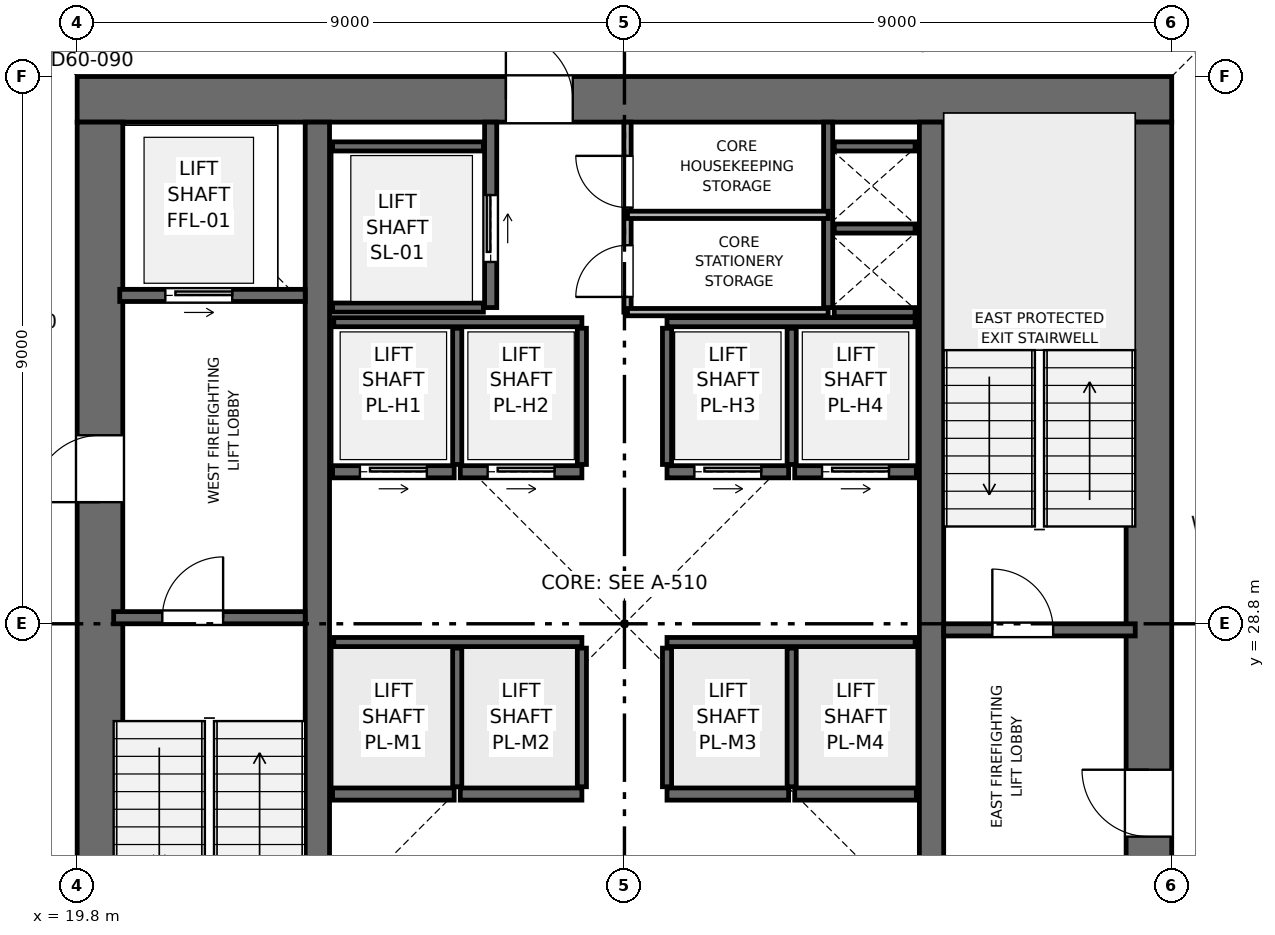
"""IFC4 building model, lengths in metres.
Left out: names, types, materials, properties, quantities, classifications, styles, units other than length and angle.
Written with IfcOpenShell. Run it as: python <this file> out.ifc"""

import sys

from ifc_helpers import new_model, si_unit, direction, frame, frame_2d, origin, place, context, subcontext, project, spatial, rectangle, extrude, element, fill, save


model = new_model("IFC4")
c1 = context("Model", 3, precision=1e-05, world=origin(), true_north=direction((0.0, 1.0)))
c2 = subcontext(c1, "Body", "Model", "MODEL_VIEW")
j1 = project(units=[si_unit("LENGTHUNIT", "METRE"), si_unit("PLANEANGLEUNIT", "RADIAN")], contexts=[c1])
p1 = place(None, origin())
s1 = spatial("IfcSite", under=j1, at=p1, CompositionType="ELEMENT")
p2 = place(p1, origin())
s2 = spatial("IfcBuilding", under=s1, at=p2, CompositionType="ELEMENT")
p3 = place(p2, frame((0.0, 0.0, 246.6)))
s3 = spatial("IfcBuildingStorey", under=s2, at=p3, CompositionType="ELEMENT", Elevation=246.6)
p4 = place(p3, frame((19.8, 37.425, 0.0), z_axis=(0.0, 0.0, 1.0), x_axis=(1.0, 0.0, 0.0)))
e1 = element("IfcWall", 1, at=p4, inside=s3, PredefinedType="SHEAR", context=c2, shape_type="SweptSolid", body=[
    extrude(rectangle(XDim=18.0, YDim=0.75, at=frame_2d((9.0, 0.0))), origin(), (0.0, 0.0, 1.0), 3.75),
])
p5 = place(p4, frame((7.05, 0.0, 0.0)))
e2 = element("IfcOpeningElement", 2, at=p5, cuts=e1, PredefinedType="OPENING", context=c2, shape_type="SweptSolid", body=[
    extrude(rectangle(XDim=1.1, YDim=2.15, at=frame_2d((0.55, 1.075))), frame((0.0, 0.385, 0.0), z_axis=(0.0, -1.0, 0.0), x_axis=(1.0, 0.0, 0.0)), (0.0, 0.0, 1.0), 0.77),
])
p6 = place(p3, frame((20.175, 20.55, 0.0), z_axis=(0.0, 0.0, 1.0), x_axis=(0.0, 1.0, 0.0)))
e3 = element("IfcWall", 3, at=p6, inside=s3, PredefinedType="SHEAR", context=c2, shape_type="SweptSolid", body=[
    extrude(rectangle(XDim=16.5, YDim=0.75, at=frame_2d((8.25, 0.0))), origin(), (0.0, 0.0, 1.0), 3.75),
])
p7 = place(p6, frame((10.25, 0.0, 0.0)))
e4 = element("IfcOpeningElement", 4, at=p7, cuts=e3, PredefinedType="OPENING", context=c2, shape_type="SweptSolid", body=[
    extrude(rectangle(XDim=1.1, YDim=2.15, at=frame_2d((0.55, 1.075))), frame((0.0, 0.385, 0.0), z_axis=(0.0, -1.0, 0.0), x_axis=(1.0, 0.0, 0.0)), (0.0, 0.0, 1.0), 0.77),
])
p8 = place(p3, frame((37.425, 20.55, 0.0), z_axis=(0.0, 0.0, 1.0), x_axis=(0.0, 1.0, 0.0)))
e5 = element("IfcWall", 5, at=p8, inside=s3, PredefinedType="SHEAR", context=c2, shape_type="SweptSolid", body=[
    extrude(rectangle(XDim=16.5, YDim=0.75, at=frame_2d((8.25, 0.0))), origin(), (0.0, 0.0, 1.0), 3.75),
])
p9 = place(p8, frame((4.75, 0.0, 0.0)))
e6 = element("IfcOpeningElement", 6, at=p9, cuts=e5, PredefinedType="OPENING", context=c2, shape_type="SweptSolid", body=[
    extrude(rectangle(XDim=1.1, YDim=2.15, at=frame_2d((0.55, 1.075))), frame((0.0, 0.385, 0.0), z_axis=(0.0, -1.0, 0.0), x_axis=(1.0, 0.0, 0.0)), (0.0, 0.0, 1.0), 0.77),
])
for number, where, z_axis, x_axis in (
    (7, (23.75, 20.55, 0.0), (0.0, 0.0, 1.0), (0.0, 1.0, 0.0)),
    (8, (33.85, 20.55, 0.0), (0.0, 0.0, 1.0), (0.0, 1.0, 0.0)),
):
    element("IfcWall", number, at=place(p3, frame(where, z_axis=z_axis, x_axis=x_axis)), inside=s3, PredefinedType="SHEAR", context=c2, shape_type="SweptSolid", body=[
        extrude(rectangle(XDim=16.5, YDim=0.4, at=frame_2d((8.25, 0.0))), origin(), (0.0, 0.0, 1.0), 3.75),
    ])
p10 = place(p3, frame((20.4, 28.9, 0.0), z_axis=(0.0, 0.0, 1.0), x_axis=(1.0, 0.0, 0.0)))
e9 = element("IfcWall", 9, at=p10, inside=s3, PredefinedType="SHEAR", context=c2, shape_type="SweptSolid", body=[
    extrude(rectangle(XDim=3.15, YDim=0.2, at=frame_2d((1.575, 0.0))), origin(), (0.0, 0.0, 1.0), 3.5),
])
p11 = place(p10, frame((0.8, 0.0, 0.0)))
e10 = element("IfcOpeningElement", 10, at=p11, cuts=e9, PredefinedType="OPENING", context=c2, shape_type="SweptSolid", body=[
    extrude(rectangle(XDim=1.0, YDim=2.1, at=frame_2d((0.5, 1.05))), frame((0.0, 0.11, 0.0), z_axis=(0.0, -1.0, 0.0), x_axis=(1.0, 0.0, 0.0)), (0.0, 0.0, 1.0), 0.22),
])
p12 = place(p3, frame((34.05, 28.7, 0.0), z_axis=(0.0, 0.0, 1.0), x_axis=(1.0, 0.0, 0.0)))
e11 = element("IfcWall", 11, at=p12, inside=s3, PredefinedType="SHEAR", context=c2, shape_type="SweptSolid", body=[
    extrude(rectangle(XDim=3.15, YDim=0.2, at=frame_2d((1.575, 0.0))), origin(), (0.0, 0.0, 1.0), 3.5),
])
p13 = place(p12, frame((0.8, 0.0, 0.0)))
e12 = element("IfcOpeningElement", 12, at=p13, cuts=e11, PredefinedType="OPENING", context=c2, shape_type="SweptSolid", body=[
    extrude(rectangle(XDim=1.0, YDim=2.1, at=frame_2d((0.5, 1.05))), frame((0.0, 0.11, 0.0), z_axis=(0.0, -1.0, 0.0), x_axis=(1.0, 0.0, 0.0)), (0.0, 0.0, 1.0), 0.22),
])
p14 = place(p3, frame((32.15, 34.0, 0.0), z_axis=(0.0, 0.0, 1.0), x_axis=(0.0, 1.0, 0.0)))
e13 = element("IfcWall", 13, at=p14, inside=s3, PredefinedType="SHEAR", context=c2, shape_type="SweptSolid", body=[
    extrude(rectangle(XDim=3.05, YDim=0.15, at=frame_2d((1.525, 0.0))), origin(), (0.0, 0.0, 1.0), 3.5),
])
for number, where, z_axis, x_axis in (
    (14, (32.25, 33.925, 0.0), (0.0, 0.0, 1.0), (1.0, 0.0, 0.0)),
    (15, (32.25, 35.3, 0.0), (0.0, 0.0, 1.0), (1.0, 0.0, 0.0)),
):
    element("IfcWall", number, at=place(p3, frame(where, z_axis=z_axis, x_axis=x_axis)), inside=s3, PredefinedType="SHEAR", context=c2, shape_type="SweptSolid", body=[
        extrude(rectangle(XDim=1.33, YDim=0.15, at=frame_2d((0.665, 0.0))), origin(), (0.0, 0.0, 1.0), 3.5),
    ])
p15 = place(p3, frame((20.5, 34.2, 0.0), z_axis=(0.0, 0.0, 1.0), x_axis=(1.0, 0.0, 0.0)))
e16 = element("IfcWall", 16, at=p15, inside=s3, PredefinedType="SHEAR", context=c2, shape_type="SweptSolid", body=[
    extrude(rectangle(XDim=3.05, YDim=0.2, at=frame_2d((1.525, 0.0))), origin(), (0.0, 0.0, 1.0), 3.5),
])
p16 = place(p15, frame((0.75, 0.0, 0.0)))
e17 = element("IfcOpeningElement", 17, at=p16, cuts=e16, PredefinedType="OPENING", context=c2, shape_type="SweptSolid", body=[
    extrude(rectangle(XDim=1.1, YDim=2.15, at=frame_2d((0.55, 1.075))), frame((0.0, 0.11, 0.0), z_axis=(0.0, -1.0, 0.0), x_axis=(1.0, 0.0, 0.0)), (0.0, 0.0, 1.0), 0.22),
])
p17 = place(p3, frame((26.6, 34.0, 0.0), z_axis=(0.0, 0.0, 1.0), x_axis=(0.0, 1.0, 0.0)))
e18 = element("IfcWall", 18, at=p17, inside=s3, PredefinedType="SHEAR", context=c2, shape_type="SweptSolid", body=[
    extrude(rectangle(XDim=3.05, YDim=0.2, at=frame_2d((1.525, 0.0))), origin(), (0.0, 0.0, 1.0), 3.5),
])
p18 = place(p17, frame((0.75, 0.0, 0.0)))
e19 = element("IfcOpeningElement", 19, at=p18, cuts=e18, PredefinedType="OPENING", context=c2, shape_type="SweptSolid", body=[
    extrude(rectangle(XDim=1.1, YDim=2.15, at=frame_2d((0.55, 1.075))), frame((0.0, 0.11, 0.0), z_axis=(0.0, -1.0, 0.0), x_axis=(1.0, 0.0, 0.0)), (0.0, 0.0, 1.0), 0.22),
])
for number, where, z_axis, x_axis in (
    (20, (24.0, 34.0, 0.0), (0.0, 0.0, 1.0), (1.0, 0.0, 0.0)),
    (21, (24.0, 36.65, 0.0), (0.0, 0.0, 1.0), (1.0, 0.0, 0.0)),
):
    element("IfcWall", number, at=place(p3, frame(where, z_axis=z_axis, x_axis=x_axis)), inside=s3, PredefinedType="SHEAR", context=c2, shape_type="SweptSolid", body=[
        extrude(rectangle(XDim=2.48, YDim=0.15, at=frame_2d((1.24, 0.0))), origin(), (0.0, 0.0, 1.0), 3.5),
    ])
for number, where, z_axis, x_axis in (
    (22, (24.0, 26.0, 0.0), (0.0, 0.0, 1.0), (1.0, 0.0, 0.0)),
    (23, (26.1, 26.0, 0.0), (0.0, 0.0, 1.0), (1.0, 0.0, 0.0)),
    (24, (29.5, 26.0, 0.0), (0.0, 0.0, 1.0), (1.0, 0.0, 0.0)),
    (25, (31.6, 26.0, 0.0), (0.0, 0.0, 1.0), (1.0, 0.0, 0.0)),
):
    element("IfcWall", number, at=place(p3, frame(where, z_axis=z_axis, x_axis=x_axis)), inside=s3, PredefinedType="SHEAR", context=c2, shape_type="SweptSolid", body=[
        extrude(rectangle(XDim=2.0, YDim=0.2, at=frame_2d((1.0, 0.0))), origin(), (0.0, 0.0, 1.0), 3.5),
    ])
p19 = place(p3, frame((24.0, 31.3, 0.0), z_axis=(0.0, 0.0, 1.0), x_axis=(1.0, 0.0, 0.0)))
e26 = element("IfcWall", 26, at=p19, inside=s3, PredefinedType="SHEAR", context=c2, shape_type="SweptSolid", body=[
    extrude(rectangle(XDim=2.0, YDim=0.2, at=frame_2d((1.0, 0.0))), origin(), (0.0, 0.0, 1.0), 3.5),
])
p20 = place(p19, frame((0.45, 0.0, 0.0)))
e27 = element("IfcOpeningElement", 27, at=p20, cuts=e26, PredefinedType="OPENING", context=c2, shape_type="SweptSolid", body=[
    extrude(rectangle(XDim=1.1, YDim=2.15, at=frame_2d((0.55, 1.075))), frame((0.0, 0.11, 0.0), z_axis=(0.0, -1.0, 0.0), x_axis=(1.0, 0.0, 0.0)), (0.0, 0.0, 1.0), 0.22),
])
p21 = place(p3, frame((26.1, 31.3, 0.0), z_axis=(0.0, 0.0, 1.0), x_axis=(1.0, 0.0, 0.0)))
e28 = element("IfcWall", 28, at=p21, inside=s3, PredefinedType="SHEAR", context=c2, shape_type="SweptSolid", body=[
    extrude(rectangle(XDim=2.0, YDim=0.2, at=frame_2d((1.0, 0.0))), origin(), (0.0, 0.0, 1.0), 3.5),
])
p22 = place(p21, frame((0.45, 0.0, 0.0)))
e29 = element("IfcOpeningElement", 29, at=p22, cuts=e28, PredefinedType="OPENING", context=c2, shape_type="SweptSolid", body=[
    extrude(rectangle(XDim=1.1, YDim=2.15, at=frame_2d((0.55, 1.075))), frame((0.0, 0.11, 0.0), z_axis=(0.0, -1.0, 0.0), x_axis=(1.0, 0.0, 0.0)), (0.0, 0.0, 1.0), 0.22),
])
p23 = place(p3, frame((29.5, 31.3, 0.0), z_axis=(0.0, 0.0, 1.0), x_axis=(1.0, 0.0, 0.0)))
e30 = element("IfcWall", 30, at=p23, inside=s3, PredefinedType="SHEAR", context=c2, shape_type="SweptSolid", body=[
    extrude(rectangle(XDim=2.0, YDim=0.2, at=frame_2d((1.0, 0.0))), origin(), (0.0, 0.0, 1.0), 3.5),
])
p24 = place(p23, frame((0.45, 0.0, 0.0)))
e31 = element("IfcOpeningElement", 31, at=p24, cuts=e30, PredefinedType="OPENING", context=c2, shape_type="SweptSolid", body=[
    extrude(rectangle(XDim=1.1, YDim=2.15, at=frame_2d((0.55, 1.075))), frame((0.0, 0.11, 0.0), z_axis=(0.0, -1.0, 0.0), x_axis=(1.0, 0.0, 0.0)), (0.0, 0.0, 1.0), 0.22),
])
p25 = place(p3, frame((31.6, 31.3, 0.0), z_axis=(0.0, 0.0, 1.0), x_axis=(1.0, 0.0, 0.0)))
e32 = element("IfcWall", 32, at=p25, inside=s3, PredefinedType="SHEAR", context=c2, shape_type="SweptSolid", body=[
    extrude(rectangle(XDim=2.0, YDim=0.2, at=frame_2d((1.0, 0.0))), origin(), (0.0, 0.0, 1.0), 3.5),
])
p26 = place(p25, frame((0.45, 0.0, 0.0)))
e33 = element("IfcOpeningElement", 33, at=p26, cuts=e32, PredefinedType="OPENING", context=c2, shape_type="SweptSolid", body=[
    extrude(rectangle(XDim=1.1, YDim=2.15, at=frame_2d((0.55, 1.075))), frame((0.0, 0.11, 0.0), z_axis=(0.0, -1.0, 0.0), x_axis=(1.0, 0.0, 0.0)), (0.0, 0.0, 1.0), 0.22),
])
p27 = place(p3, frame((32.25, 36.65, 0.0), z_axis=(0.0, 0.0, 1.0), x_axis=(1.0, 0.0, 0.0)))
e34 = element("IfcWall", 34, at=p27, inside=s3, PredefinedType="SHEAR", context=c2, shape_type="SweptSolid", body=[
    extrude(rectangle(XDim=1.33, YDim=0.15, at=frame_2d((0.665, 0.0))), origin(), (0.0, 0.0, 1.0), 3.5),
])
for number, where, z_axis, x_axis in (
    (35, (24.02, 28.5, 0.0), (0.0, 0.0, 1.0), (1.0, 0.0, 0.0)),
    (36, (29.5, 28.5, 0.0), (0.0, 0.0, 1.0), (1.0, 0.0, 0.0)),
):
    element("IfcWall", number, at=place(p3, frame(where, z_axis=z_axis, x_axis=x_axis)), inside=s3, PredefinedType="SHEAR", context=c2, shape_type="SweptSolid", body=[
        extrude(rectangle(XDim=4.08, YDim=0.15, at=frame_2d((2.04, 0.0))), origin(), (0.0, 0.0, 1.0), 3.5),
    ])
for number, where, z_axis, x_axis in (
    (37, (26.05, 26.12, 0.0), (0.0, 0.0, 1.0), (0.0, 1.0, 0.0)),
    (38, (28.1, 26.12, 0.0), (0.0, 0.0, 1.0), (0.0, 1.0, 0.0)),
    (39, (29.5, 26.12, 0.0), (0.0, 0.0, 1.0), (0.0, 1.0, 0.0)),
    (40, (31.55, 26.12, 0.0), (0.0, 0.0, 1.0), (0.0, 1.0, 0.0)),
):
    element("IfcWall", number, at=place(p3, frame(where, z_axis=z_axis, x_axis=x_axis)), inside=s3, PredefinedType="SHEAR", context=c2, shape_type="SweptSolid", body=[
        extrude(rectangle(XDim=2.28, YDim=0.15, at=frame_2d((1.14, 0.0))), origin(), (0.0, 0.0, 1.0), 3.5),
    ])
for number, where, z_axis, x_axis in (
    (41, (24.02, 33.76, 0.0), (0.0, 0.0, 1.0), (1.0, 0.0, 0.0)),
    (42, (29.5, 33.76, 0.0), (0.0, 0.0, 1.0), (1.0, 0.0, 0.0)),
):
    element("IfcWall", number, at=place(p3, frame(where, z_axis=z_axis, x_axis=x_axis)), inside=s3, PredefinedType="SHEAR", context=c2, shape_type="SweptSolid", body=[
        extrude(rectangle(XDim=4.08, YDim=0.15, at=frame_2d((2.04, 0.0))), origin(), (0.0, 0.0, 1.0), 3.5),
    ])
for number, where, z_axis, x_axis in (
    (43, (26.05, 31.42, 0.0), (0.0, 0.0, 1.0), (0.0, 1.0, 0.0)),
    (44, (28.1, 31.42, 0.0), (0.0, 0.0, 1.0), (0.0, 1.0, 0.0)),
    (45, (29.5, 31.42, 0.0), (0.0, 0.0, 1.0), (0.0, 1.0, 0.0)),
    (46, (31.55, 31.42, 0.0), (0.0, 0.0, 1.0), (0.0, 1.0, 0.0)),
):
    element("IfcWall", number, at=place(p3, frame(where, z_axis=z_axis, x_axis=x_axis)), inside=s3, PredefinedType="SHEAR", context=c2, shape_type="SweptSolid", body=[
        extrude(rectangle(XDim=2.24, YDim=0.15, at=frame_2d((1.12, 0.0))), origin(), (0.0, 0.0, 1.0), 3.5),
    ])
p28 = place(p3, frame((28.85, 33.925, 0.0), z_axis=(0.0, 0.0, 1.0), x_axis=(0.0, 1.0, 0.0)))
e47 = element("IfcWall", 47, at=p28, inside=s3, PredefinedType="PARTITIONING", context=c2, shape_type="SweptSolid", body=[
    extrude(rectangle(XDim=3.125, YDim=0.12, at=frame_2d((1.562, 0.0))), origin(), (0.0, 0.0, 1.0), 3.5),
])
p29 = place(p28, frame((0.25, 0.0, 0.0)))
e48 = element("IfcOpeningElement", 48, at=p29, cuts=e47, PredefinedType="OPENING", context=c2, shape_type="SweptSolid", body=[
    extrude(rectangle(XDim=0.85, YDim=2.1, at=frame_2d((0.425, 1.05))), frame((0.0, 0.07, 0.0), z_axis=(0.0, -1.0, 0.0), x_axis=(1.0, 0.0, 0.0)), (0.0, 0.0, 1.0), 0.14),
])
p30 = place(p28, frame((1.72, 0.0, 0.0)))
e49 = element("IfcOpeningElement", 49, at=p30, cuts=e47, PredefinedType="OPENING", context=c2, shape_type="SweptSolid", body=[
    extrude(rectangle(XDim=0.85, YDim=2.1, at=frame_2d((0.425, 1.05))), frame((0.0, 0.07, 0.0), z_axis=(0.0, -1.0, 0.0), x_axis=(1.0, 0.0, 0.0)), (0.0, 0.0, 1.0), 0.14),
])
for number, where, z_axis, x_axis in (
    (50, (28.85, 35.525, 0.0), (0.0, 0.0, 1.0), (1.0, 0.0, 0.0)),
    (51, (28.85, 33.925, 0.0), (0.0, 0.0, 1.0), (1.0, 0.0, 0.0)),
):
    element("IfcWall", number, at=place(p3, frame(where, z_axis=z_axis, x_axis=x_axis)), inside=s3, PredefinedType="PARTITIONING", context=c2, shape_type="SweptSolid", body=[
        extrude(rectangle(XDim=3.3, YDim=0.12, at=frame_2d((1.65, 0.0))), origin(), (0.0, 0.0, 1.0), 3.5),
    ])
p31 = place(p11, origin())
e52 = element("IfcDoor", 52, at=p31, inside=s3, OperationType="SINGLE_SWING_RIGHT", PredefinedType="DOOR", context=c2, shape_type="SweptSolid", body=[
    extrude(rectangle(XDim=1.0, YDim=2.1, at=frame_2d((0.5, 1.05))), frame((0.0, 0.025, 0.0), z_axis=(0.0, -1.0, 0.0), x_axis=(1.0, 0.0, 0.0)), (0.0, 0.0, 1.0), 0.05),
])
fill(e10, e52)
p32 = place(p13, origin())
e53 = element("IfcDoor", 53, at=p32, inside=s3, OperationType="SINGLE_SWING_LEFT", PredefinedType="DOOR", context=c2, shape_type="SweptSolid", body=[
    extrude(rectangle(XDim=1.0, YDim=2.1, at=frame_2d((0.5, 1.05))), frame((0.0, 0.025, 0.0), z_axis=(0.0, -1.0, 0.0), x_axis=(1.0, 0.0, 0.0)), (0.0, 0.0, 1.0), 0.05),
])
fill(e12, e53)
p33 = place(p16, origin())
e54 = element("IfcDoor", 54, at=p33, inside=s3, OperationType="SLIDING_TO_RIGHT", PredefinedType="DOOR", context=c2, shape_type="SweptSolid", body=[
    extrude(rectangle(XDim=1.1, YDim=2.15, at=frame_2d((0.55, 1.075))), frame((0.0, 0.025, 0.0), z_axis=(0.0, -1.0, 0.0), x_axis=(1.0, 0.0, 0.0)), (0.0, 0.0, 1.0), 0.05),
])
fill(e17, e54)
p34 = place(p18, origin())
e55 = element("IfcDoor", 55, at=p34, inside=s3, OperationType="SLIDING_TO_RIGHT", PredefinedType="DOOR", context=c2, shape_type="SweptSolid", body=[
    extrude(rectangle(XDim=1.1, YDim=2.15, at=frame_2d((0.55, 1.075))), frame((0.0, 0.025, 0.0), z_axis=(0.0, -1.0, 0.0), x_axis=(1.0, 0.0, 0.0)), (0.0, 0.0, 1.0), 0.05),
])
fill(e19, e55)
p35 = place(p20, origin())
e56 = element("IfcDoor", 56, at=p35, inside=s3, OperationType="SLIDING_TO_RIGHT", PredefinedType="DOOR", context=c2, shape_type="SweptSolid", body=[
    extrude(rectangle(XDim=1.1, YDim=2.15, at=frame_2d((0.55, 1.075))), frame((0.0, 0.025, 0.0), z_axis=(0.0, -1.0, 0.0), x_axis=(1.0, 0.0, 0.0)), (0.0, 0.0, 1.0), 0.05),
])
fill(e27, e56)
p36 = place(p22, origin())
e57 = element("IfcDoor", 57, at=p36, inside=s3, OperationType="SLIDING_TO_RIGHT", PredefinedType="DOOR", context=c2, shape_type="SweptSolid", body=[
    extrude(rectangle(XDim=1.1, YDim=2.15, at=frame_2d((0.55, 1.075))), frame((0.0, 0.025, 0.0), z_axis=(0.0, -1.0, 0.0), x_axis=(1.0, 0.0, 0.0)), (0.0, 0.0, 1.0), 0.05),
])
fill(e29, e57)
p37 = place(p24, origin())
e58 = element("IfcDoor", 58, at=p37, inside=s3, OperationType="SLIDING_TO_RIGHT", PredefinedType="DOOR", context=c2, shape_type="SweptSolid", body=[
    extrude(rectangle(XDim=1.1, YDim=2.15, at=frame_2d((0.55, 1.075))), frame((0.0, 0.025, 0.0), z_axis=(0.0, -1.0, 0.0), x_axis=(1.0, 0.0, 0.0)), (0.0, 0.0, 1.0), 0.05),
])
fill(e31, e58)
p38 = place(p26, origin())
e59 = element("IfcDoor", 59, at=p38, inside=s3, OperationType="SLIDING_TO_RIGHT", PredefinedType="DOOR", context=c2, shape_type="SweptSolid", body=[
    extrude(rectangle(XDim=1.1, YDim=2.15, at=frame_2d((0.55, 1.075))), frame((0.0, 0.025, 0.0), z_axis=(0.0, -1.0, 0.0), x_axis=(1.0, 0.0, 0.0)), (0.0, 0.0, 1.0), 0.05),
])
fill(e33, e59)
p39 = place(p29, origin())
e60 = element("IfcDoor", 60, at=p39, inside=s3, OperationType="SINGLE_SWING_LEFT", PredefinedType="DOOR", context=c2, shape_type="SweptSolid", body=[
    extrude(rectangle(XDim=0.85, YDim=2.1, at=frame_2d((0.425, 1.05))), frame((0.0, 0.025, 0.0), z_axis=(0.0, -1.0, 0.0), x_axis=(1.0, 0.0, 0.0)), (0.0, 0.0, 1.0), 0.05),
])
fill(e48, e60)
p40 = place(p30, origin())
e61 = element("IfcDoor", 61, at=p40, inside=s3, OperationType="SINGLE_SWING_RIGHT", PredefinedType="DOOR", context=c2, shape_type="SweptSolid", body=[
    extrude(rectangle(XDim=0.85, YDim=2.1, at=frame_2d((0.425, 1.05))), frame((0.0, 0.025, 0.0), z_axis=(0.0, -1.0, 0.0), x_axis=(1.0, 0.0, 0.0)), (0.0, 0.0, 1.0), 0.05),
])
fill(e49, e61)
p41 = place(p7, origin())
e62 = element("IfcDoor", 62, at=p41, inside=s3, OperationType="SINGLE_SWING_LEFT", PredefinedType="DOOR", context=c2, shape_type="SweptSolid", body=[
    extrude(rectangle(XDim=1.1, YDim=2.15, at=frame_2d((0.55, 1.075))), frame((0.0, 0.025, 0.0), z_axis=(0.0, -1.0, 0.0), x_axis=(1.0, 0.0, 0.0)), (0.0, 0.0, 1.0), 0.05),
])
fill(e4, e62)
p42 = place(p9, origin())
e63 = element("IfcDoor", 63, at=p42, inside=s3, OperationType="SINGLE_SWING_RIGHT", PredefinedType="DOOR", context=c2, shape_type="SweptSolid", body=[
    extrude(rectangle(XDim=1.1, YDim=2.15, at=frame_2d((0.55, 1.075))), frame((0.0, 0.025, 0.0), z_axis=(0.0, -1.0, 0.0), x_axis=(1.0, 0.0, 0.0)), (0.0, 0.0, 1.0), 0.05),
])
fill(e6, e63)
p43 = place(p5, origin())
e64 = element("IfcDoor", 64, at=p43, inside=s3, OperationType="SINGLE_SWING_LEFT", PredefinedType="DOOR", context=c2, shape_type="SweptSolid", body=[
    extrude(rectangle(XDim=1.1, YDim=2.15, at=frame_2d((0.55, 1.075))), frame((0.0, 0.025, 0.0), z_axis=(0.0, -1.0, 0.0), x_axis=(1.0, 0.0, 0.0)), (0.0, 0.0, 1.0), 0.05),
])
fill(e2, e64)
save(model, sys.argv[1])
